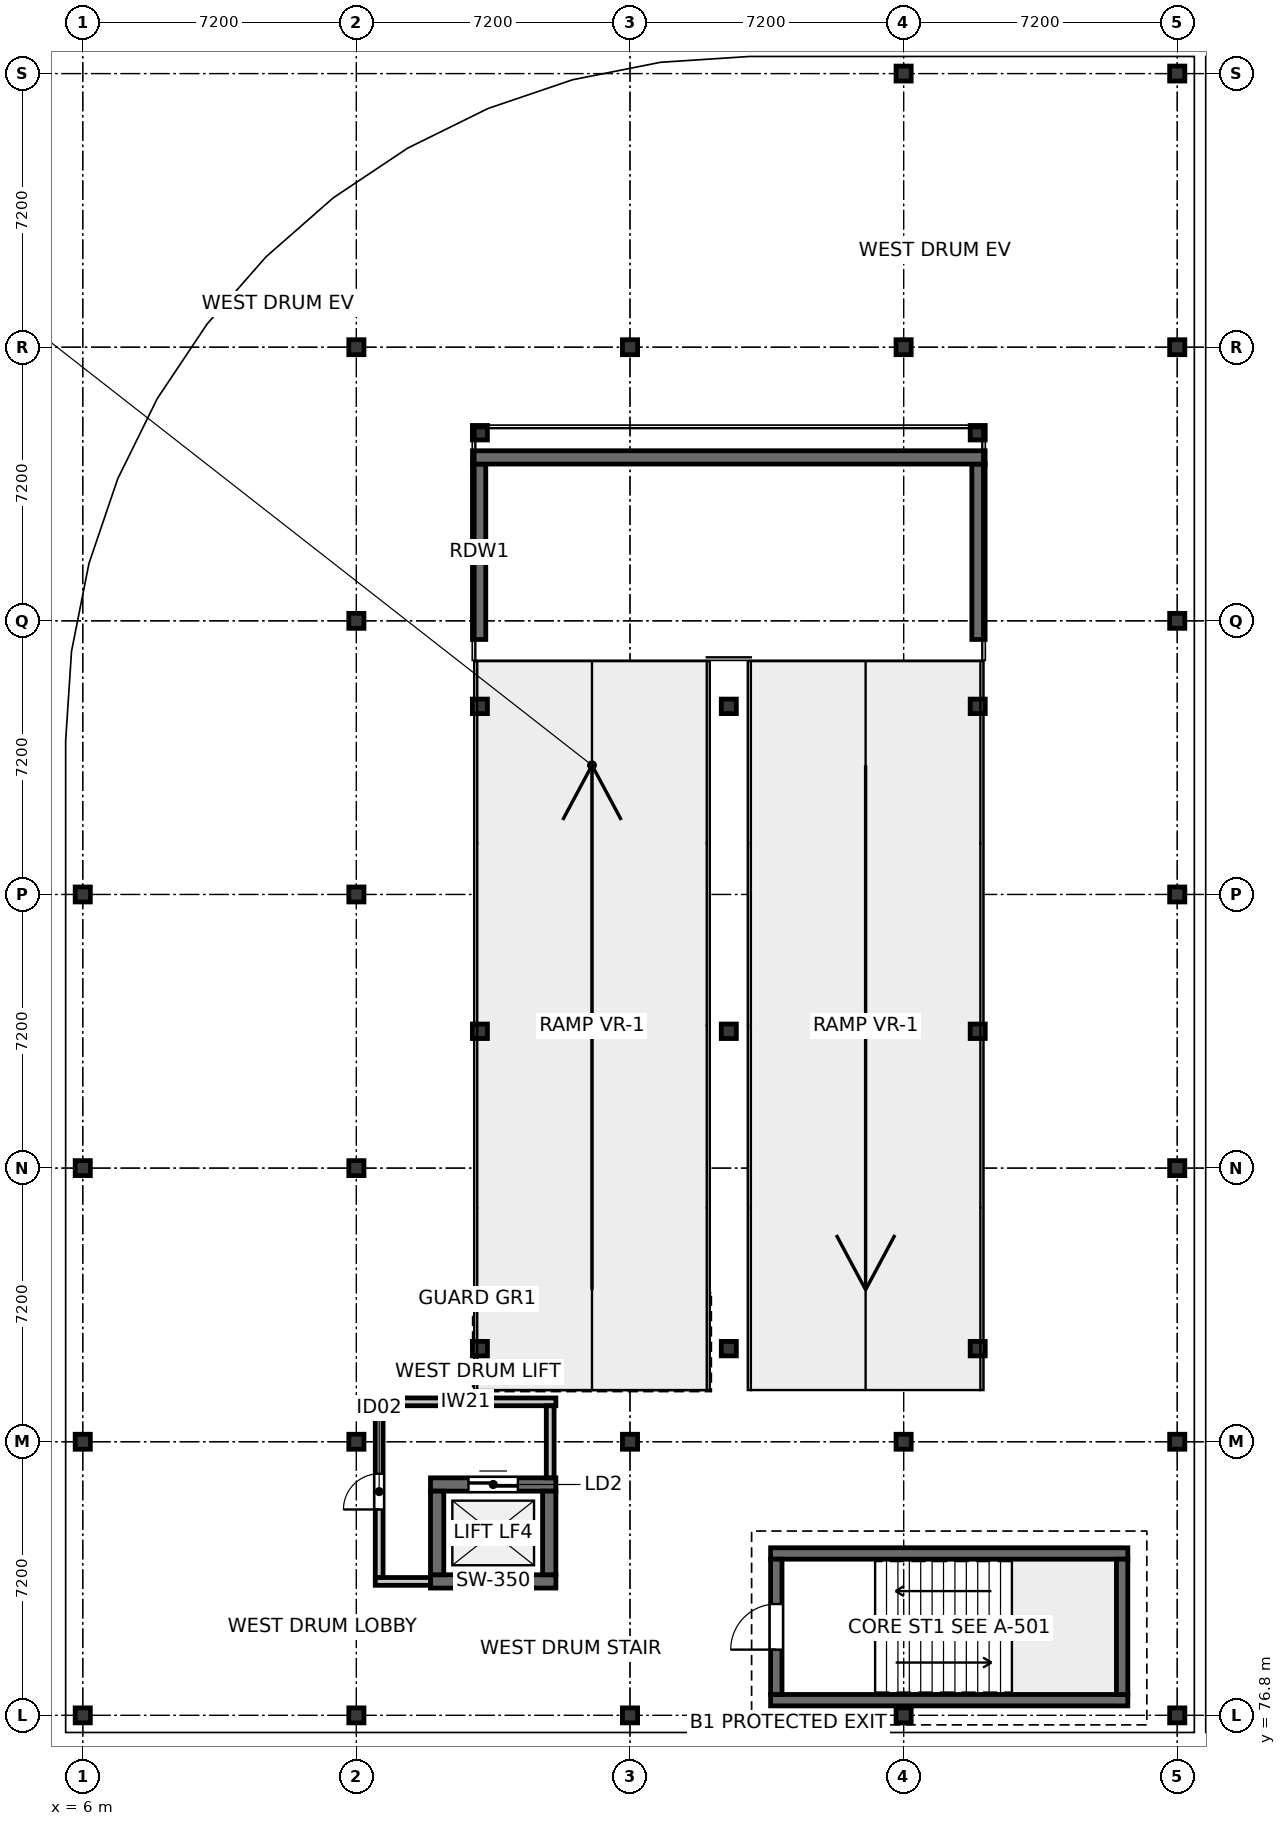
"""IFC4 building model, lengths in metres.
Left out: names, types, materials, properties, quantities, classifications, styles, units other than length and angle.
Written with IfcOpenShell. Run it as: python <this file> out.ifc"""

import sys

from ifc_helpers import new_model, si_unit, direction, frame, frame_2d, origin, origin_2d, place, context, subcontext, project, spatial, rectangle, i_section, extrude, element, fill, save


model = new_model("IFC4")
c1 = context("Model", 3, precision=1e-05, world=origin(), true_north=direction((0.0, 1.0)))
c2 = subcontext(c1, "Body", "Model", "MODEL_VIEW")
j1 = project(units=[si_unit("LENGTHUNIT", "METRE"), si_unit("PLANEANGLEUNIT", "RADIAN")], contexts=[c1])
p1 = place(None, origin())
s1 = spatial("IfcSite", under=j1, at=p1, CompositionType="ELEMENT")
p2 = place(p1, origin())
s2 = spatial("IfcBuilding", under=s1, at=p2, CompositionType="ELEMENT")
p3 = place(p2, frame((0.0, 0.0, -4.5)))
s3 = spatial("IfcBuildingStorey", under=s2, at=p3, CompositionType="ELEMENT", Elevation=-4.5)
for number, where, z_axis, x_axis in (
    (1, (6.0, 76.8, 0.0), (0.0, 0.0, 1.0), (1.0, 0.0, 0.0)),
    (2, (6.0, 84.0, 0.0), (0.0, 0.0, 1.0), (1.0, 0.0, 0.0)),
    (3, (6.0, 91.2, 0.0), (0.0, 0.0, 1.0), (1.0, 0.0, 0.0)),
    (4, (6.0, 98.4, 0.0), (0.0, 0.0, 1.0), (1.0, 0.0, 0.0)),
    (5, (13.2, 76.8, 0.0), (0.0, 0.0, 1.0), (1.0, 0.0, 0.0)),
    (6, (13.2, 84.0, 0.0), (0.0, 0.0, 1.0), (1.0, 0.0, 0.0)),
    (7, (13.2, 91.2, 0.0), (0.0, 0.0, 1.0), (1.0, 0.0, 0.0)),
    (8, (13.2, 98.4, 0.0), (0.0, 0.0, 1.0), (1.0, 0.0, 0.0)),
    (9, (13.2, 105.6, 0.0), (0.0, 0.0, 1.0), (1.0, 0.0, 0.0)),
    (10, (13.2, 112.8, 0.0), (0.0, 0.0, 1.0), (1.0, 0.0, 0.0)),
    (11, (20.4, 76.8, 0.0), (0.0, 0.0, 1.0), (1.0, 0.0, 0.0)),
    (12, (20.4, 84.0, 0.0), (0.0, 0.0, 1.0), (1.0, 0.0, 0.0)),
    (13, (20.4, 112.8, 0.0), (0.0, 0.0, 1.0), (1.0, 0.0, 0.0)),
    (14, (27.6, 76.8, 0.0), (0.0, 0.0, 1.0), (1.0, 0.0, 0.0)),
    (15, (27.6, 84.0, 0.0), (0.0, 0.0, 1.0), (1.0, 0.0, 0.0)),
    (16, (27.6, 112.8, 0.0), (0.0, 0.0, 1.0), (1.0, 0.0, 0.0)),
    (17, (27.6, 120.0, 0.0), (0.0, 0.0, 1.0), (1.0, 0.0, 0.0)),
    (18, (34.8, 76.8, 0.0), (0.0, 0.0, 1.0), (1.0, 0.0, 0.0)),
    (19, (34.8, 84.0, 0.0), (0.0, 0.0, 1.0), (1.0, 0.0, 0.0)),
    (20, (34.8, 91.2, 0.0), (0.0, 0.0, 1.0), (1.0, 0.0, 0.0)),
    (21, (34.8, 98.4, 0.0), (0.0, 0.0, 1.0), (1.0, 0.0, 0.0)),
    (22, (34.8, 105.6, 0.0), (0.0, 0.0, 1.0), (1.0, 0.0, 0.0)),
    (23, (34.8, 112.8, 0.0), (0.0, 0.0, 1.0), (1.0, 0.0, 0.0)),
    (24, (34.8, 120.0, 0.0), (0.0, 0.0, 1.0), (1.0, 0.0, 0.0)),
):
    element("IfcColumn", number, at=place(p3, frame(where, z_axis=z_axis, x_axis=x_axis)), inside=s3, PredefinedType="COLUMN", context=c2, shape_type="SweptSolid", body=[
        extrude(i_section(OverallWidth=0.399, OverallDepth=0.394, WebThickness=0.023, FlangeThickness=0.037, FilletRadius=0.015, at=origin_2d()), origin(), (0.0, 0.0, 1.0), 4.5),
    ])
for number, where, z_axis, x_axis in (
    (25, (16.45, 86.45, 0.0), (0.0, 0.0, 1.0), (1.0, 0.0, 0.0)),
    (26, (23.0, 86.45, 0.0), (0.0, 0.0, 1.0), (1.0, 0.0, 0.0)),
    (27, (29.55, 86.45, 0.0), (0.0, 0.0, 1.0), (1.0, 0.0, 0.0)),
    (28, (16.45, 94.8, 0.0), (0.0, 0.0, 1.0), (1.0, 0.0, 0.0)),
    (29, (23.0, 94.8, 0.0), (0.0, 0.0, 1.0), (1.0, 0.0, 0.0)),
    (30, (29.55, 94.8, 0.0), (0.0, 0.0, 1.0), (1.0, 0.0, 0.0)),
    (31, (16.45, 103.35, 0.0), (0.0, 0.0, 1.0), (1.0, 0.0, 0.0)),
    (32, (23.0, 103.35, 0.0), (0.0, 0.0, 1.0), (1.0, 0.0, 0.0)),
    (33, (29.55, 103.35, 0.0), (0.0, 0.0, 1.0), (1.0, 0.0, 0.0)),
    (34, (16.45, 110.55, 0.0), (0.0, 0.0, 1.0), (1.0, 0.0, 0.0)),
    (35, (29.55, 110.55, 0.0), (0.0, 0.0, 1.0), (1.0, 0.0, 0.0)),
):
    element("IfcColumn", number, at=place(p3, frame(where, z_axis=z_axis, x_axis=x_axis)), inside=s3, PredefinedType="COLUMN", context=c2, shape_type="SweptSolid", body=[
        extrude(i_section(OverallWidth=0.396, OverallDepth=0.381, WebThickness=0.019, FlangeThickness=0.03, FilletRadius=0.015, at=origin_2d()), origin(), (0.0, 0.0, 1.0), 4.5),
    ])
for number, where, z_axis, x_axis in (
    (36, (16.43, 105.11, 0.0), (0.0, 0.0, 1.0), (0.0, 1.0, 0.0)),
    (37, (29.57, 105.11, 0.0), (0.0, 0.0, 1.0), (0.0, 1.0, 0.0)),
):
    element("IfcWall", number, at=place(p3, frame(where, z_axis=z_axis, x_axis=x_axis)), inside=s3, PredefinedType="SHEAR", context=c2, shape_type="SweptSolid", body=[
        extrude(rectangle(XDim=4.615, YDim=0.35, at=frame_2d((2.308, 0.0))), origin(), (0.0, 0.0, 1.0), 1.97),
    ])
p4 = place(p3, frame((16.255, 109.9, 0.0), z_axis=(0.0, 0.0, 1.0), x_axis=(1.0, 0.0, 0.0)))
e38 = element("IfcWall", 38, at=p4, inside=s3, PredefinedType="SHEAR", context=c2, shape_type="SweptSolid", body=[
    extrude(rectangle(XDim=13.49, YDim=0.35, at=frame_2d((6.745, 0.0))), origin(), (0.0, 0.0, 1.0), 1.97),
])
for number, where, z_axis, x_axis in (
    (39, (33.5, 77.2, 0.0), (0.0, 0.0, 1.0), (-1.0, 0.0, 0.0)),
    (40, (24.1, 81.06, 0.0), (0.0, 0.0, 1.0), (1.0, 0.0, 0.0)),
):
    element("IfcWall", number, at=place(p3, frame(where, z_axis=z_axis, x_axis=x_axis)), inside=s3, PredefinedType="SOLIDWALL", context=c2, shape_type="SweptSolid", body=[
        extrude(rectangle(XDim=9.4, YDim=0.3, at=frame_2d((4.7, 0.0))), origin(), (0.0, 0.0, 1.0), 4.25),
    ])
p5 = place(p3, frame((24.25, 77.35, 0.0), z_axis=(0.0, 0.0, 1.0), x_axis=(0.0, 1.0, 0.0)))
e41 = element("IfcWall", 41, at=p5, inside=s3, PredefinedType="SOLIDWALL", context=c2, shape_type="SweptSolid", body=[
    extrude(rectangle(XDim=3.56, YDim=0.3, at=frame_2d((1.78, 0.0))), origin(), (0.0, 0.0, 1.0), 4.25),
])
p6 = place(p5, frame((1.18, 0.0, 0.0)))
e42 = element("IfcOpeningElement", 42, at=p6, cuts=e41, PredefinedType="OPENING", context=c2, shape_type="SweptSolid", body=[
    extrude(rectangle(XDim=1.2, YDim=2.2, at=frame_2d((0.6, 1.1))), frame((0.0, 0.16, 0.0), z_axis=(0.0, -1.0, 0.0), x_axis=(1.0, 0.0, 0.0)), (0.0, 0.0, 1.0), 0.32),
])
p7 = place(p3, frame((33.35, 80.91, 0.0), z_axis=(0.0, 0.0, 1.0), x_axis=(0.0, -1.0, 0.0)))
e43 = element("IfcWall", 43, at=p7, inside=s3, PredefinedType="SOLIDWALL", context=c2, shape_type="SweptSolid", body=[
    extrude(rectangle(XDim=3.56, YDim=0.3, at=frame_2d((1.78, 0.0))), origin(), (0.0, 0.0, 1.0), 4.25),
])
p8 = place(p3, frame((18.45, 80.325, 0.0), z_axis=(0.0, 0.0, 1.0), x_axis=(-1.0, 0.0, 0.0)))
e44 = element("IfcWall", 44, at=p8, inside=s3, PredefinedType="SHEAR", context=c2, shape_type="SweptSolid", body=[
    extrude(rectangle(XDim=3.3, YDim=0.35, at=frame_2d((1.65, 0.0))), origin(), (0.0, 0.0, 1.0), 4.25),
])
p9 = place(p3, frame((15.15, 82.875, 0.0), z_axis=(0.0, 0.0, 1.0), x_axis=(1.0, 0.0, 0.0)))
e45 = element("IfcWall", 45, at=p9, inside=s3, PredefinedType="SHEAR", context=c2, shape_type="SweptSolid", body=[
    extrude(rectangle(XDim=3.3, YDim=0.35, at=frame_2d((1.65, 0.0))), origin(), (0.0, 0.0, 1.0), 4.25),
])
p10 = place(p9, frame((1.0, 0.0, 0.0)))
e46 = element("IfcOpeningElement", 46, at=p10, cuts=e45, PredefinedType="OPENING", context=c2, shape_type="SweptSolid", body=[
    extrude(rectangle(XDim=1.3, YDim=2.2, at=frame_2d((0.65, 1.1))), frame((0.0, 0.185, 0.0), z_axis=(0.0, -1.0, 0.0), x_axis=(1.0, 0.0, 0.0)), (0.0, 0.0, 1.0), 0.37),
])
for number, where, z_axis, x_axis in (
    (47, (15.325, 80.5, 0.0), (0.0, 0.0, 1.0), (0.0, 1.0, 0.0)),
    (48, (18.275, 82.7, 0.0), (0.0, 0.0, 1.0), (0.0, -1.0, 0.0)),
):
    element("IfcWall", number, at=place(p3, frame(where, z_axis=z_axis, x_axis=x_axis)), inside=s3, PredefinedType="SHEAR", context=c2, shape_type="SweptSolid", body=[
        extrude(rectangle(XDim=2.2, YDim=0.35, at=frame_2d((1.1, 0.0))), origin(), (0.0, 0.0, 1.0), 4.25),
    ])
p11 = place(p3, frame((13.698, 85.05, 0.0), z_axis=(0.0, 0.0, 1.0), x_axis=(1.0, 0.0, 0.0)))
e49 = element("IfcWall", 49, at=p11, inside=s3, PredefinedType="PARTITIONING", context=c2, shape_type="SweptSolid", body=[
    extrude(rectangle(XDim=4.752, YDim=0.205, at=frame_2d((2.376, 0.0))), origin(), (0.0, 0.0, 1.0), 3.618),
])
p12 = place(p3, frame((15.148, 80.325, 0.0), z_axis=(0.0, 0.0, 1.0), x_axis=(-1.0, 0.0, 0.0)))
e50 = element("IfcWall", 50, at=p12, inside=s3, PredefinedType="PARTITIONING", context=c2, shape_type="SweptSolid", body=[
    extrude(rectangle(XDim=1.45, YDim=0.205, at=frame_2d((0.725, 0.0))), origin(), (0.0, 0.0, 1.0), 3.618),
])
p13 = place(p3, frame((13.8, 80.43, 0.0), z_axis=(0.0, 0.0, 1.0), x_axis=(0.0, 1.0, 0.0)))
e51 = element("IfcWall", 51, at=p13, inside=s3, PredefinedType="PARTITIONING", context=c2, shape_type="SweptSolid", body=[
    extrude(rectangle(XDim=4.516, YDim=0.205, at=frame_2d((2.258, 0.0))), origin(), (0.0, 0.0, 1.0), 3.618),
])
p14 = place(p13, frame((1.788, 0.0, 0.0)))
e52 = element("IfcOpeningElement", 52, at=p14, cuts=e51, PredefinedType="OPENING", context=c2, shape_type="SweptSolid", body=[
    extrude(rectangle(XDim=0.94, YDim=2.1, at=frame_2d((0.47, 1.05))), frame((0.0, 0.113, 0.0), z_axis=(0.0, -1.0, 0.0), x_axis=(1.0, 0.0, 0.0)), (0.0, 0.0, 1.0), 0.225),
])
p15 = place(p3, frame((18.3, 84.946, 0.0), z_axis=(0.0, 0.0, 1.0), x_axis=(0.0, -1.0, 0.0)))
e53 = element("IfcWall", 53, at=p15, inside=s3, PredefinedType="PARTITIONING", context=c2, shape_type="SweptSolid", body=[
    extrude(rectangle(XDim=1.894, YDim=0.205, at=frame_2d((0.947, 0.0))), origin(), (0.0, 0.0, 1.0), 3.618),
])
p16 = place(p6, origin())
e54 = element("IfcDoor", 54, at=p16, inside=s3, OperationType="SINGLE_SWING_LEFT", PredefinedType="DOOR", context=c2, shape_type="SweptSolid", body=[
    extrude(rectangle(XDim=1.2, YDim=2.2, at=frame_2d((0.6, 1.1))), frame((0.0, 0.025, 0.0), z_axis=(0.0, -1.0, 0.0), x_axis=(1.0, 0.0, 0.0)), (0.0, 0.0, 1.0), 0.05),
])
fill(e42, e54)
p17 = place(p10, origin())
e55 = element("IfcDoor", 55, at=p17, inside=s3, OperationType="DOUBLE_DOOR_SLIDING", PredefinedType="DOOR", context=c2, shape_type="SweptSolid", body=[
    extrude(rectangle(XDim=1.3, YDim=2.2, at=frame_2d((0.65, 1.1))), frame((0.0, 0.025, 0.0), z_axis=(0.0, -1.0, 0.0), x_axis=(1.0, 0.0, 0.0)), (0.0, 0.0, 1.0), 0.05),
])
fill(e46, e55)
p18 = place(p14, origin())
e56 = element("IfcDoor", 56, at=p18, inside=s3, OperationType="SINGLE_SWING_LEFT", PredefinedType="DOOR", context=c2, shape_type="SweptSolid", body=[
    extrude(rectangle(XDim=0.94, YDim=2.1, at=frame_2d((0.47, 1.05))), frame((0.0, 0.025, 0.0), z_axis=(0.0, -1.0, 0.0), x_axis=(1.0, 0.0, 0.0)), (0.0, 0.0, 1.0), 0.05),
])
fill(e52, e56)
save(model, sys.argv[1])
